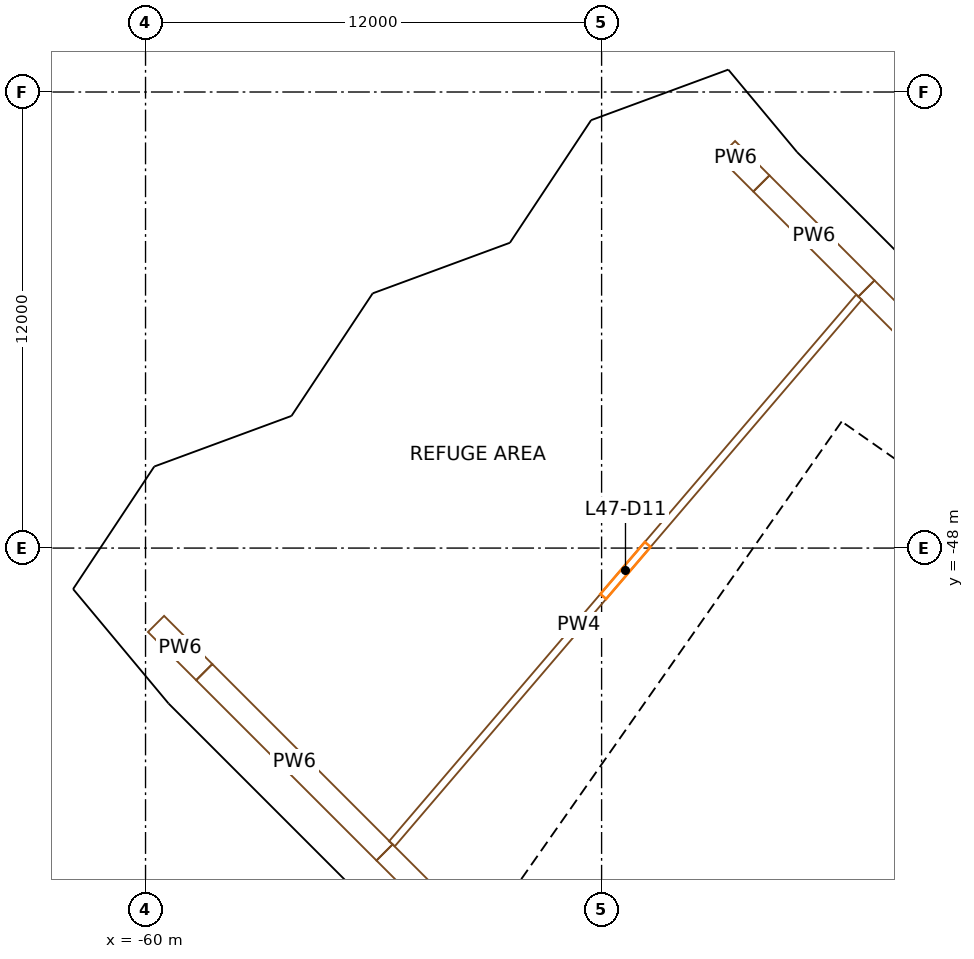
"""IFC4 building model, lengths in metres.
Left out: names, types, materials, properties, quantities, classifications, styles, units other than length and angle.
Written with IfcOpenShell. Run it as: python <this file> out.ifc"""

import sys

from ifc_helpers import new_model, si_unit, direction, frame, frame_2d, origin, origin_2d, place, context, subcontext, project, spatial, rectangle, extrude, element, fill, save


model = new_model("IFC4")
c1 = context("Model", 3, precision=1e-05, world=origin(), true_north=direction((0.0, 1.0)))
c2 = subcontext(c1, "Body", "Model", "MODEL_VIEW")
j1 = project(units=[si_unit("LENGTHUNIT", "METRE"), si_unit("PLANEANGLEUNIT", "RADIAN")], contexts=[c1])
p1 = place(None, origin())
s1 = spatial("IfcSite", under=j1, at=p1, CompositionType="ELEMENT")
p2 = place(p1, origin())
s2 = spatial("IfcBuilding", under=s1, at=p2, CompositionType="ELEMENT")
p3 = place(p2, frame((0.0, 0.0, 198.7)))
s3 = spatial("IfcBuildingStorey", under=s2, at=p3, CompositionType="ELEMENT", Elevation=198.7)
for number, where, z_axis, x_axis in (
    (1, (-43.795, -38.407, 0.0), (0.0, 0.0, 1.0), (0.659, -0.752, 0.0)),
    (2, (-58.456, -51.264, 0.0), (0.0, 0.0, 1.0), (0.659, -0.752, 0.0)),
):
    element("IfcColumn", number, at=place(p3, frame(where, z_axis=z_axis, x_axis=x_axis)), inside=s3, PredefinedType="COLUMN", context=c2, shape_type="SweptSolid", body=[
        extrude(rectangle(XDim=1.1, YDim=1.3, at=origin_2d()), origin(), (0.0, 0.0, 1.0), 5.0),
    ])
p4 = place(p3, frame((-49.483, -57.031, 0.0), z_axis=(0.0, 0.0, 1.0), x_axis=(0.573560421458, 0.819163257805, 0.0)))
e3 = element("IfcWall", 3, at=p4, inside=s3, PredefinedType="SHEAR", context=c2, shape_type="SweptSolid", body=[
    extrude(rectangle(XDim=14.2, YDim=0.6, at=frame_2d((7.1, 0.0))), origin(), (0.0, 0.0, 1.0), 4.7),
])
p5 = place(p4, frame((6.4, 0.0, 0.0)))
e4 = element("IfcOpeningElement", 4, at=p5, cuts=e3, PredefinedType="OPENING", context=c2, shape_type="SweptSolid", body=[
    extrude(rectangle(XDim=1.4, YDim=2.1, at=frame_2d((0.7, 1.05))), frame((0.0, 0.31, 0.0), z_axis=(0.0, -1.0, 0.0), x_axis=(1.0, 0.0, 0.0)), (0.0, 0.0, 1.0), 0.62),
])
p6 = place(p3, frame((-28.941, -54.447, 0.0), z_axis=(0.0, 0.0, 1.0), x_axis=(-0.819153391756, 0.573574511963, 0.0)))
e5 = element("IfcWall", 5, at=p6, inside=s3, PredefinedType="SHEAR", context=c2, shape_type="SweptSolid", body=[
    extrude(rectangle(XDim=15.045, YDim=0.6, at=frame_2d((7.523, 0.0))), origin(), (0.0, 0.0, 1.0), 4.7),
])
p7 = place(p6, frame((3.45, 0.0, 0.0)))
e6 = element("IfcOpeningElement", 6, at=p7, cuts=e5, PredefinedType="OPENING", context=c2, shape_type="SweptSolid", body=[
    extrude(rectangle(XDim=1.0, YDim=2.1, at=frame_2d((0.5, 1.05))), frame((0.0, 0.31, 0.0), z_axis=(0.0, -1.0, 0.0), x_axis=(1.0, 0.0, 0.0)), (0.0, 0.0, 1.0), 0.62),
])
p8 = place(p6, frame((13.495, 0.0, 0.0)))
e7 = element("IfcOpeningElement", 7, at=p8, cuts=e5, PredefinedType="OPENING", context=c2, shape_type="SweptSolid", body=[
    extrude(rectangle(XDim=1.1, YDim=2.1, at=frame_2d((0.55, 1.05))), frame((0.0, 0.31, 0.0), z_axis=(0.0, -1.0, 0.0), x_axis=(1.0, 0.0, 0.0)), (0.0, 0.0, 1.0), 0.62),
])
p9 = place(p3, frame((-43.204, -60.696, 0.0), z_axis=(0.0, 0.0, 1.0), x_axis=(0.573571992966, 0.819155155563, 0.0)))
e8 = element("IfcWall", 8, at=p9, inside=s3, PredefinedType="SOLIDWALL", context=c2, shape_type="SweptSolid", body=[
    extrude(rectangle(XDim=13.0, YDim=0.3, at=frame_2d((6.5, 0.0))), origin(), (0.0, 0.0, 1.0), 4.7),
])
p10 = place(p3, frame((-33.787, -61.369, 0.0), z_axis=(0.0, 0.0, 1.0), x_axis=(-0.819152564888, 0.573575692858, 0.0)))
e9 = element("IfcWall", 9, at=p10, inside=s3, PredefinedType="SOLIDWALL", context=c2, shape_type="SweptSolid", body=[
    extrude(rectangle(XDim=7.95, YDim=0.3, at=frame_2d((3.975, 0.0))), origin(), (0.0, 0.0, 1.0), 4.7),
])
p11 = place(p10, frame((0.675, 0.0, 0.0)))
e10 = element("IfcOpeningElement", 10, at=p11, cuts=e9, PredefinedType="OPENING", context=c2, shape_type="SweptSolid", body=[
    extrude(rectangle(XDim=1.1, YDim=2.1, at=frame_2d((0.55, 1.05))), frame((0.0, 0.16, 0.0), z_axis=(0.0, -1.0, 0.0), x_axis=(1.0, 0.0, 0.0)), (0.0, 0.0, 1.0), 0.32),
])
p12 = place(p10, frame((3.425, 0.0, 0.0)))
e11 = element("IfcOpeningElement", 11, at=p12, cuts=e9, PredefinedType="OPENING", context=c2, shape_type="SweptSolid", body=[
    extrude(rectangle(XDim=1.1, YDim=2.1, at=frame_2d((0.55, 1.05))), frame((0.0, 0.16, 0.0), z_axis=(0.0, -1.0, 0.0), x_axis=(1.0, 0.0, 0.0)), (0.0, 0.0, 1.0), 0.32),
])
p13 = place(p10, frame((6.175, 0.0, 0.0)))
e12 = element("IfcOpeningElement", 12, at=p13, cuts=e9, PredefinedType="OPENING", context=c2, shape_type="SweptSolid", body=[
    extrude(rectangle(XDim=1.1, YDim=2.1, at=frame_2d((0.55, 1.05))), frame((0.0, 0.16, 0.0), z_axis=(0.0, -1.0, 0.0), x_axis=(1.0, 0.0, 0.0)), (0.0, 0.0, 1.0), 0.32),
])
p14 = place(p3, frame((-37.936, -52.91, 0.0), z_axis=(0.0, 0.0, 1.0), x_axis=(-0.819147518138, 0.57358290031, 0.0)))
e13 = element("IfcWall", 13, at=p14, inside=s3, PredefinedType="SOLIDWALL", context=c2, shape_type="SweptSolid", body=[
    extrude(rectangle(XDim=6.795, YDim=0.3, at=frame_2d((3.398, 0.0))), origin(), (0.0, 0.0, 1.0), 4.7),
])
p15 = place(p14, frame((5.32, 0.0, 0.0)))
e14 = element("IfcOpeningElement", 14, at=p15, cuts=e13, PredefinedType="OPENING", context=c2, shape_type="SweptSolid", body=[
    extrude(rectangle(XDim=1.1, YDim=2.1, at=frame_2d((0.55, 1.05))), frame((0.0, 0.16, 0.0), z_axis=(0.0, -1.0, 0.0), x_axis=(1.0, 0.0, 0.0)), (0.0, 0.0, 1.0), 0.32),
])
p16 = place(p3, frame((-41.262, -57.661, 0.0), z_axis=(0.0, 0.0, 1.0), x_axis=(-0.819164398642, 0.573558792102, 0.0)))
e15 = element("IfcWall", 15, at=p16, inside=s3, PredefinedType="SOLIDWALL", context=c2, shape_type="SweptSolid", body=[
    extrude(rectangle(XDim=6.795, YDim=0.3, at=frame_2d((3.397, 0.0))), origin(), (0.0, 0.0, 1.0), 4.7),
])
p17 = place(p16, frame((5.32, 0.0, 0.0)))
e16 = element("IfcOpeningElement", 16, at=p17, cuts=e15, PredefinedType="OPENING", context=c2, shape_type="SweptSolid", body=[
    extrude(rectangle(XDim=1.1, YDim=2.1, at=frame_2d((0.55, 1.05))), frame((0.0, 0.16, 0.0), z_axis=(0.0, -1.0, 0.0), x_axis=(1.0, 0.0, 0.0)), (0.0, 0.0, 1.0), 0.32),
])
p18 = place(p3, frame((-39.599, -55.285, 0.0), z_axis=(0.0, 0.0, 1.0), x_axis=(-0.819136323161, 0.573598887793, 0.0)))
e17 = element("IfcWall", 17, at=p18, inside=s3, PredefinedType="SOLIDWALL", context=c2, shape_type="SweptSolid", body=[
    extrude(rectangle(XDim=3.0, YDim=0.5, at=frame_2d((1.5, 0.0))), origin(), (0.0, 0.0, 1.0), 4.7),
])
p19 = place(p3, frame((-43.757, -55.731, 0.0), z_axis=(0.0, 0.0, 1.0), x_axis=(0.573536818435, 0.819179783625, 0.0)))
e18 = element("IfcWall", 18, at=p19, inside=s3, PredefinedType="SOLIDWALL", context=c2, shape_type="SweptSolid", body=[
    extrude(rectangle(XDim=5.5, YDim=0.3, at=frame_2d((2.75, 0.0))), origin(), (0.0, 0.0, 1.0), 4.7),
])
p20 = place(p19, frame((0.7, 0.0, 0.0)))
e19 = element("IfcOpeningElement", 19, at=p20, cuts=e18, PredefinedType="OPENING", context=c2, shape_type="SweptSolid", body=[
    extrude(rectangle(XDim=1.1, YDim=2.1, at=frame_2d((0.55, 1.05))), frame((0.0, 0.16, 0.0), z_axis=(0.0, -1.0, 0.0), x_axis=(1.0, 0.0, 0.0)), (0.0, 0.0, 1.0), 0.32),
])
p21 = place(p19, frame((3.7, 0.0, 0.0)))
e20 = element("IfcOpeningElement", 20, at=p21, cuts=e18, PredefinedType="OPENING", context=c2, shape_type="SweptSolid", body=[
    extrude(rectangle(XDim=1.1, YDim=2.1, at=frame_2d((0.55, 1.05))), frame((0.0, 0.16, 0.0), z_axis=(0.0, -1.0, 0.0), x_axis=(1.0, 0.0, 0.0)), (0.0, 0.0, 1.0), 0.32),
])
p22 = place(p3, frame((-41.587, -48.369, 0.0), z_axis=(0.0, 0.0, 1.0), x_axis=(0.573495128918, 0.819208970354, 0.0)))
e21 = element("IfcWall", 21, at=p22, inside=s3, PredefinedType="SOLIDWALL", context=c2, shape_type="SweptSolid", body=[
    extrude(rectangle(XDim=0.5, YDim=0.3, at=frame_2d((0.25, 0.0))), origin(), (0.0, 0.0, 1.0), 2.3),
])
p23 = place(p3, frame((-47.065, -56.192, 0.0), z_axis=(0.0, 0.0, 1.0), x_axis=(0.573822822947, 0.818979467304, 0.0)))
e22 = element("IfcWall", 22, at=p23, inside=s3, PredefinedType="SOLIDWALL", context=c2, shape_type="SweptSolid", body=[
    extrude(rectangle(XDim=0.5, YDim=0.3, at=frame_2d((0.25, 0.0))), origin(), (0.0, 0.0, 1.0), 2.3),
])
p24 = place(p3, frame((-44.551, -35.582, 0.0), z_axis=(0.0, 0.0, 1.0), x_axis=(-0.938303010861, -0.345814198391, 0.0)))
e23 = element("IfcWall", 23, at=p24, inside=s3, PredefinedType="SOLIDWALL", context=c2, shape_type="SweptSolid", body=[
    extrude(rectangle(XDim=3.95, YDim=0.4, at=frame_2d((1.975, 0.0))), origin(), (0.0, 0.0, 1.0), 3.6),
])
p25 = place(p3, frame((-48.264, -37.085, 0.0), z_axis=(0.0, 0.0, 1.0), x_axis=(-0.552339362866, -0.833619354519, 0.0)))
e24 = element("IfcWall", 24, at=p25, inside=s3, PredefinedType="SOLIDWALL", context=c2, shape_type="SweptSolid", body=[
    extrude(rectangle(XDim=3.44, YDim=0.4, at=frame_2d((1.72, 0.0))), origin(), (0.0, 0.0, 1.0), 3.6),
])
p26 = place(p3, frame((-50.17, -40.09, 0.0), z_axis=(0.0, 0.0, 1.0), x_axis=(-0.938263557137, -0.345921229977, 0.0)))
e25 = element("IfcWall", 25, at=p26, inside=s3, PredefinedType="SOLIDWALL", context=c2, shape_type="SweptSolid", body=[
    extrude(rectangle(XDim=4.088, YDim=0.4, at=frame_2d((2.044, 0.0))), origin(), (0.0, 0.0, 1.0), 3.6),
])
p27 = place(p3, frame((-54.011, -41.642, 0.0), z_axis=(0.0, 0.0, 1.0), x_axis=(-0.552240074834, -0.833685132258, 0.0)))
e26 = element("IfcWall", 26, at=p27, inside=s3, PredefinedType="SOLIDWALL", context=c2, shape_type="SweptSolid", body=[
    extrude(rectangle(XDim=3.438, YDim=0.4, at=frame_2d((1.719, 0.0))), origin(), (0.0, 0.0, 1.0), 3.6),
])
p28 = place(p3, frame((-55.916, -44.646, 0.0), z_axis=(0.0, 0.0, 1.0), x_axis=(-0.938253377417, -0.345948839809, 0.0)))
e27 = element("IfcWall", 27, at=p28, inside=s3, PredefinedType="SOLIDWALL", context=c2, shape_type="SweptSolid", body=[
    extrude(rectangle(XDim=4.089, YDim=0.4, at=frame_2d((2.044, 0.0))), origin(), (0.0, 0.0, 1.0), 3.6),
])
p29 = place(p3, frame((-59.759, -46.198, 0.0), z_axis=(0.0, 0.0, 1.0), x_axis=(-0.552103091092, -0.833775855255, 0.0)))
e28 = element("IfcWall", 28, at=p29, inside=s3, PredefinedType="SOLIDWALL", context=c2, shape_type="SweptSolid", body=[
    extrude(rectangle(XDim=3.192, YDim=0.4, at=frame_2d((1.596, 0.0))), origin(), (0.0, 0.0, 1.0), 3.6),
])
p30 = place(p3, frame((-43.027, -37.689, 0.0), z_axis=(0.0, 0.0, 1.0), x_axis=(-0.640513668318, 0.767946769443, 0.0)))
e29 = element("IfcWall", 29, at=p30, inside=s3, PredefinedType="SOLIDWALL", context=c2, shape_type="SweptSolid", body=[
    extrude(rectangle(XDim=2.406, YDim=0.4, at=frame_2d((1.203, 0.0))), origin(), (0.0, 0.0, 1.0), 3.6),
])
p31 = place(p3, frame((-37.697, -43.023, 0.0), z_axis=(0.0, 0.0, 1.0), x_axis=(-0.707106781187, 0.707106781187, 0.0)))
e30 = element("IfcWall", 30, at=p31, inside=s3, PredefinedType="SOLIDWALL", context=c2, shape_type="SweptSolid", body=[
    extrude(rectangle(XDim=7.523, YDim=0.4, at=frame_2d((3.761, 0.0))), origin(), (0.0, 0.0, 1.0), 3.6),
])
p32 = place(p3, frame((-61.779, -48.918, 0.0), z_axis=(0.0, 0.0, 1.0), x_axis=(0.640472397118, -0.767981190219, 0.0)))
e31 = element("IfcWall", 31, at=p32, inside=s3, PredefinedType="SOLIDWALL", context=c2, shape_type="SweptSolid", body=[
    extrude(rectangle(XDim=2.001, YDim=0.4, at=frame_2d((1.0, 0.0))), origin(), (0.0, 0.0, 1.0), 3.6),
])
p33 = place(p3, frame((-60.497, -50.455, 0.0), z_axis=(0.0, 0.0, 1.0), x_axis=(0.640501112374, -0.767957241679, 0.0)))
e32 = element("IfcWall", 32, at=p33, inside=s3, PredefinedType="SOLIDWALL", context=c2, shape_type="SweptSolid", body=[
    extrude(rectangle(XDim=1.971, YDim=0.4, at=frame_2d((0.985, 0.0))), origin(), (0.0, 0.0, 1.0), 3.6),
])
p34 = place(p3, frame((-59.221, -51.98, 0.0), z_axis=(0.0, 0.0, 1.0), x_axis=(0.707106781187, -0.707106781187, 0.0)))
e33 = element("IfcWall", 33, at=p34, inside=s3, PredefinedType="SOLIDWALL", context=c2, shape_type="SweptSolid", body=[
    extrude(rectangle(XDim=10.223, YDim=0.4, at=frame_2d((5.111, 0.0))), origin(), (0.0, 0.0, 1.0), 3.6),
])
p35 = place(p3, frame((-59.723, -49.996, 0.0), z_axis=(0.0, 0.0, 1.0), x_axis=(0.70703858359, -0.707174972206, 0.0)))
e34 = element("IfcWall", 34, at=p35, inside=s3, PredefinedType="PARTITIONING", context=c2, shape_type="SweptSolid", body=[
    extrude(rectangle(XDim=1.79, YDim=0.6, at=frame_2d((0.895, 0.0))), origin(), (0.0, 0.0, 1.0), 3.6),
])
p36 = place(p3, frame((-58.453, -51.266, 0.0), z_axis=(0.0, 0.0, 1.0), x_axis=(0.707106781187, -0.707106781187, 0.0)))
e35 = element("IfcWall", 35, at=p36, inside=s3, PredefinedType="PARTITIONING", context=c2, shape_type="SweptSolid", body=[
    extrude(rectangle(XDim=6.707, YDim=0.6, at=frame_2d((3.353, 0.0))), origin(), (0.0, 0.0, 1.0), 3.6),
])
p37 = place(p3, frame((-53.711, -56.009, 0.0), z_axis=(0.0, 0.0, 1.0), x_axis=(0.707106781187, -0.707106781187, 0.0)))
e36 = element("IfcWall", 36, at=p37, inside=s3, PredefinedType="PARTITIONING", context=c2, shape_type="SweptSolid", body=[
    extrude(rectangle(XDim=3.438, YDim=0.6, at=frame_2d((1.719, 0.0))), origin(), (0.0, 0.0, 1.0), 3.6),
])
p38 = place(p3, frame((-44.7, -37.502, 0.0), z_axis=(0.0, 0.0, 1.0), x_axis=(0.707106781187, -0.707106781187, 0.0)))
e37 = element("IfcWall", 37, at=p38, inside=s3, PredefinedType="PARTITIONING", context=c2, shape_type="SweptSolid", body=[
    extrude(rectangle(XDim=1.277, YDim=0.6, at=frame_2d((0.638, 0.0))), origin(), (0.0, 0.0, 1.0), 3.6),
])
p39 = place(p3, frame((-43.792, -38.409, 0.0), z_axis=(0.0, 0.0, 1.0), x_axis=(0.707106781187, -0.707106781187, 0.0)))
e38 = element("IfcWall", 38, at=p39, inside=s3, PredefinedType="PARTITIONING", context=c2, shape_type="SweptSolid", body=[
    extrude(rectangle(XDim=3.905, YDim=0.6, at=frame_2d((1.952, 0.0))), origin(), (0.0, 0.0, 1.0), 3.6),
])
p40 = place(p3, frame((-53.516, -55.781, 0.0), z_axis=(0.0, 0.0, 1.0), x_axis=(0.64962900246, 0.760251378929, 0.0)))
e39 = element("IfcWall", 39, at=p40, inside=s3, PredefinedType="PARTITIONING", context=c2, shape_type="SweptSolid", body=[
    extrude(rectangle(XDim=18.918, YDim=0.2, at=frame_2d((9.459, 0.0))), origin(), (0.0, 0.0, 1.0), 3.6),
])
p41 = place(p40, frame((8.559, 0.0, 0.0)))
e40 = element("IfcOpeningElement", 40, at=p41, cuts=e39, PredefinedType="OPENING", context=c2, shape_type="SweptSolid", body=[
    extrude(rectangle(XDim=1.8, YDim=2.4, at=frame_2d((0.9, 1.2))), frame((0.0, 0.11, 0.0), z_axis=(0.0, -1.0, 0.0), x_axis=(1.0, 0.0, 0.0)), (0.0, 0.0, 1.0), 0.22),
])
p42 = place(p3, frame((-41.031, -41.17, 0.0), z_axis=(0.0, 0.0, 1.0), x_axis=(0.707106781187, -0.707106781187, 0.0)))
e41 = element("IfcWall", 41, at=p42, inside=s3, PredefinedType="PARTITIONING", context=c2, shape_type="SweptSolid", body=[
    extrude(rectangle(XDim=3.689, YDim=0.6, at=frame_2d((1.845, 0.0))), origin(), (0.0, 0.0, 1.0), 3.6),
])
p43 = place(p20, origin())
e42 = element("IfcDoor", 42, at=p43, inside=s3, OperationType="DOUBLE_DOOR_SLIDING", PredefinedType="DOOR", context=c2, shape_type="SweptSolid", body=[
    extrude(rectangle(XDim=1.1, YDim=2.1, at=frame_2d((0.55, 1.05))), frame((0.0, 0.025, 0.0), z_axis=(0.0, -1.0, 0.0), x_axis=(1.0, 0.0, 0.0)), (0.0, 0.0, 1.0), 0.05),
])
fill(e19, e42)
p44 = place(p21, origin())
e43 = element("IfcDoor", 43, at=p44, inside=s3, OperationType="DOUBLE_DOOR_SLIDING", PredefinedType="DOOR", context=c2, shape_type="SweptSolid", body=[
    extrude(rectangle(XDim=1.1, YDim=2.1, at=frame_2d((0.55, 1.05))), frame((0.0, 0.025, 0.0), z_axis=(0.0, -1.0, 0.0), x_axis=(1.0, 0.0, 0.0)), (0.0, 0.0, 1.0), 0.05),
])
fill(e20, e43)
p45 = place(p5, origin())
e44 = element("IfcDoor", 44, at=p45, inside=s3, OperationType="DOUBLE_DOOR_SINGLE_SWING", PredefinedType="DOOR", context=c2, shape_type="SweptSolid", body=[
    extrude(rectangle(XDim=1.4, YDim=2.1, at=frame_2d((0.7, 1.05))), frame((0.0, 0.025, 0.0), z_axis=(0.0, -1.0, 0.0), x_axis=(1.0, 0.0, 0.0)), (0.0, 0.0, 1.0), 0.05),
])
fill(e4, e44)
p46 = place(p8, origin())
e45 = element("IfcDoor", 45, at=p46, inside=s3, OperationType="SINGLE_SWING_RIGHT", PredefinedType="DOOR", context=c2, shape_type="SweptSolid", body=[
    extrude(rectangle(XDim=1.1, YDim=2.1, at=frame_2d((0.55, 1.05))), frame((0.0, 0.025, 0.0), z_axis=(0.0, -1.0, 0.0), x_axis=(1.0, 0.0, 0.0)), (0.0, 0.0, 1.0), 0.05),
])
fill(e7, e45)
p47 = place(p15, origin())
e46 = element("IfcDoor", 46, at=p47, inside=s3, OperationType="SINGLE_SWING_LEFT", PredefinedType="DOOR", context=c2, shape_type="SweptSolid", body=[
    extrude(rectangle(XDim=1.1, YDim=2.1, at=frame_2d((0.55, 1.05))), frame((0.0, 0.025, 0.0), z_axis=(0.0, -1.0, 0.0), x_axis=(1.0, 0.0, 0.0)), (0.0, 0.0, 1.0), 0.05),
])
fill(e14, e46)
p48 = place(p17, origin())
e47 = element("IfcDoor", 47, at=p48, inside=s3, OperationType="SINGLE_SWING_LEFT", PredefinedType="DOOR", context=c2, shape_type="SweptSolid", body=[
    extrude(rectangle(XDim=1.1, YDim=2.1, at=frame_2d((0.55, 1.05))), frame((0.0, 0.025, 0.0), z_axis=(0.0, -1.0, 0.0), x_axis=(1.0, 0.0, 0.0)), (0.0, 0.0, 1.0), 0.05),
])
fill(e16, e47)
p49 = place(p41, origin())
e48 = element("IfcDoor", 48, at=p49, inside=s3, OperationType="DOUBLE_DOOR_SINGLE_SWING", PredefinedType="DOOR", context=c2, shape_type="SweptSolid", body=[
    extrude(rectangle(XDim=1.8, YDim=2.4, at=frame_2d((0.9, 1.2))), frame((0.0, 0.025, 0.0), z_axis=(0.0, -1.0, 0.0), x_axis=(1.0, 0.0, 0.0)), (0.0, 0.0, 1.0), 0.05),
])
fill(e40, e48)
save(model, sys.argv[1])
